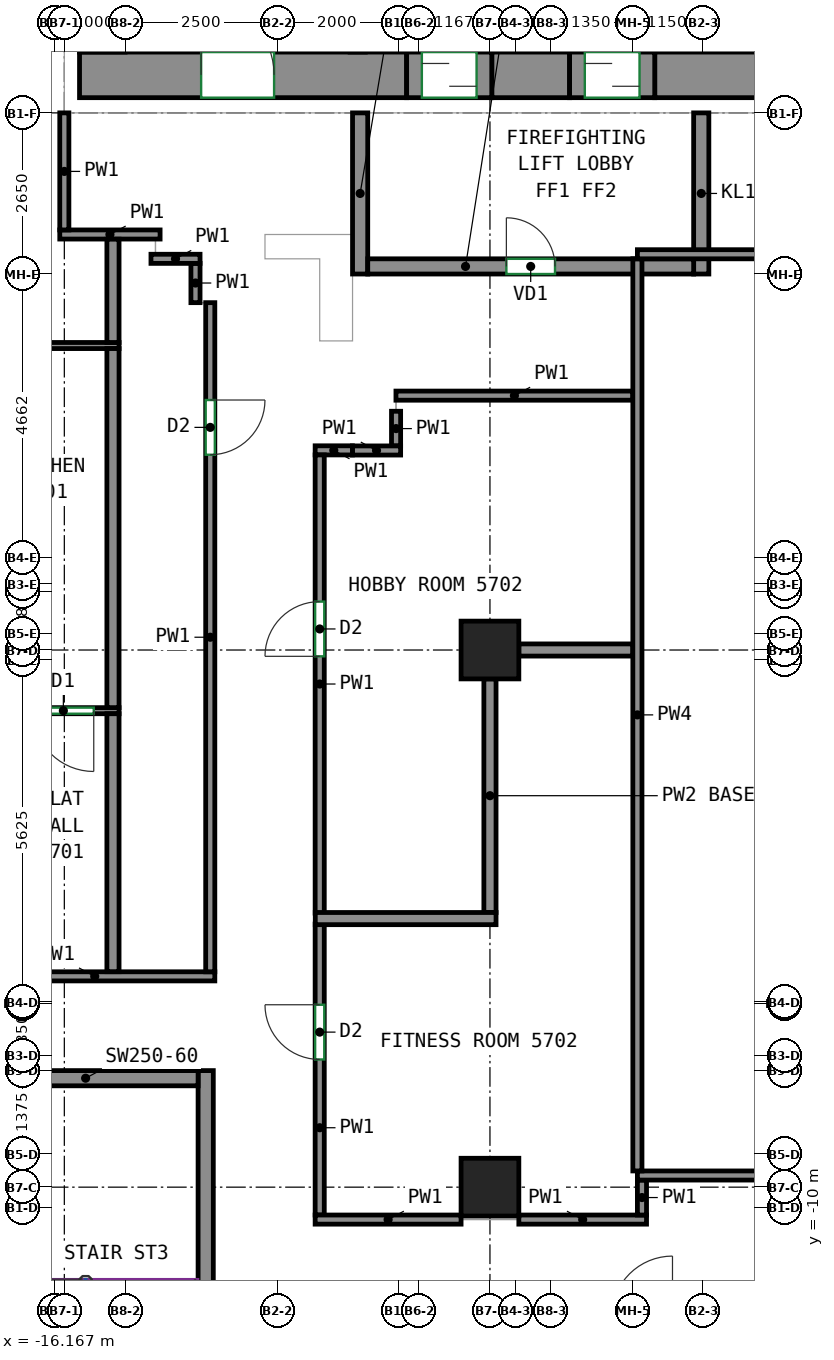
"""IFC4 building model, lengths in metres.
Left out: names, types, materials, properties, quantities, classifications, styles, units other than length and angle.
Written with IfcOpenShell. Run it as: python <this file> out.ifc"""

import sys

from ifc_helpers import new_model, si_unit, direction, frame, frame_2d, origin, origin_2d, place, context, subcontext, project, spatial, rectangle, extrude, source, transform, mapped, element, fill, save


model = new_model("IFC4")
c1 = context("Model", 3, precision=1e-05, world=origin(), true_north=direction((0.0, 1.0)))
c2 = subcontext(c1, "Body", "Model", "MODEL_VIEW")
j1 = project(units=[si_unit("LENGTHUNIT", "METRE"), si_unit("PLANEANGLEUNIT", "RADIAN")], contexts=[c1])
p1 = place(None, origin())
s1 = spatial("IfcSite", under=j1, at=p1, CompositionType="ELEMENT")
p2 = place(p1, origin())
s2 = spatial("IfcBuilding", under=s1, at=p2, CompositionType="ELEMENT")
p3 = place(p2, frame((0.0, 0.0, 239.0)))
s3 = spatial("IfcBuildingStorey", under=s2, at=p3, CompositionType="ELEMENT", Elevation=239.0)
m1 = source(origin(), c2, "Body", "SweptSolid", [
    extrude(rectangle(XDim=0.95, YDim=0.95, at=origin_2d()), origin(), (0.0, 0.0, 1.0), 3.12),
])
for number, where, z_axis, x_axis in (
    (1, (-9.0, -9.667, 0.0), (0.0, 0.0, 1.0), (1.0, 0.0, 0.0)),
    (2, (-9.0, -0.833, 0.0), (0.0, 0.0, 1.0), (1.0, 0.0, 0.0)),
):
    element("IfcColumn", number, at=place(p3, frame(where, z_axis=z_axis, x_axis=x_axis)), inside=s3, PredefinedType="COLUMN", context=c2, shape_type="MappedRepresentation", body=[
        mapped(m1, transform((0.0, 0.0, 0.0))),
    ])
m2 = source(origin(), c2, "Body", "SweptSolid", [
    extrude(rectangle(XDim=5.38, YDim=0.75, at=frame_2d((2.69, 0.0))), origin(), (0.0, 0.0, 1.0), 3.12),
])
p4 = place(p3, frame((-15.75, 8.625, 0.0), z_axis=(0.0, 0.0, 1.0), x_axis=(1.0, 0.0, 0.0)))
e3 = element("IfcWall", 3, at=p4, inside=s3, PredefinedType="SHEAR", context=c2, shape_type="MappedRepresentation", body=[
    mapped(m2, transform((0.0, 0.0, 0.0))),
])
p5 = place(p4, frame((2.0, 0.0, 0.0)))
e4 = element("IfcOpeningElement", 4, at=p5, cuts=e3, PredefinedType="OPENING", context=c2, shape_type="SweptSolid", body=[
    extrude(rectangle(XDim=1.2, YDim=2.1, at=frame_2d((0.6, 1.05))), frame((0.0, 0.385, 0.0), z_axis=(0.0, -1.0, 0.0), x_axis=(1.0, 0.0, 0.0)), (0.0, 0.0, 1.0), 0.77),
])
m3 = source(origin(), c2, "Body", "SweptSolid", [
    extrude(rectangle(XDim=1.28, YDim=0.75, at=frame_2d((0.64, 0.0))), origin(), (0.0, 0.0, 1.0), 3.12),
])
p6 = place(p3, frame((-8.97, 8.625, 0.0), z_axis=(0.0, 0.0, 1.0), x_axis=(1.0, 0.0, 0.0)))
e5 = element("IfcWall", 5, at=p6, inside=s3, PredefinedType="SHEAR", context=c2, shape_type="MappedRepresentation", body=[
    mapped(m3, transform((0.0, 0.0, 0.0))),
])
m4 = source(origin(), c2, "Body", "SweptSolid", [
    extrude(rectangle(XDim=14.18, YDim=0.75, at=frame_2d((7.09, 0.0))), origin(), (0.0, 0.0, 1.0), 3.12),
])
p7 = place(p3, frame((-6.29, 8.625, 0.0), z_axis=(0.0, 0.0, 1.0), x_axis=(1.0, 0.0, 0.0)))
e6 = element("IfcWall", 6, at=p7, inside=s3, PredefinedType="SHEAR", context=c2, shape_type="MappedRepresentation", body=[
    mapped(m4, transform((0.0, 0.0, 0.0))),
])
m5 = source(origin(), c2, "Body", "SweptSolid", [
    extrude(rectangle(XDim=8.0, YDim=0.25, at=frame_2d((4.0, 0.0))), origin(), (0.0, 0.0, 1.0), 3.12),
])
p8 = place(p3, frame((-13.675, -15.75, 0.0), z_axis=(0.0, 0.0, 1.0), x_axis=(0.0, 1.0, 0.0)))
e7 = element("IfcWall", 7, at=p8, inside=s3, PredefinedType="SHEAR", context=c2, shape_type="MappedRepresentation", body=[
    mapped(m5, transform((0.0, 0.0, 0.0))),
])
m6 = source(origin(), c2, "Body", "SweptSolid", [
    extrude(rectangle(XDim=3.7, YDim=0.25, at=frame_2d((1.85, 0.0))), origin(), (0.0, 0.0, 1.0), 3.12),
])
p9 = place(p3, frame((-17.5, -7.875, 0.0), z_axis=(0.0, 0.0, 1.0), x_axis=(1.0, 0.0, 0.0)))
e8 = element("IfcWall", 8, at=p9, inside=s3, PredefinedType="SHEAR", context=c2, shape_type="MappedRepresentation", body=[
    mapped(m6, transform((0.0, 0.0, 0.0))),
])
m7 = source(origin(), c2, "Body", "SweptSolid", [
    extrude(rectangle(XDim=2.65, YDim=0.25, at=frame_2d((1.325, 0.0))), origin(), (0.0, 0.0, 1.0), 2.57),
])
for number, where, z_axis, x_axis in (
    (9, (-11.135, 5.35, 0.0), (0.0, 0.0, 1.0), (0.0, 1.0, 0.0)),
    (10, (-5.525, 5.35, 0.0), (0.0, 0.0, 1.0), (0.0, 1.0, 0.0)),
):
    element("IfcWall", number, at=place(p3, frame(where, z_axis=z_axis, x_axis=x_axis)), inside=s3, PredefinedType="PARTITIONING", context=c2, shape_type="MappedRepresentation", body=[
        mapped(m7, transform((0.0, 0.0, 0.0))),
    ])
m8 = source(origin(), c2, "Body", "SweptSolid", [
    extrude(rectangle(XDim=5.36, YDim=0.25, at=frame_2d((2.68, 0.0))), origin(), (0.0, 0.0, 1.0), 3.12),
])
p10 = place(p3, frame((-11.01, 5.475, 0.0), z_axis=(0.0, 0.0, 1.0), x_axis=(1.0, 0.0, 0.0)))
e11 = element("IfcWall", 11, at=p10, inside=s3, PredefinedType="PARTITIONING", context=c2, shape_type="MappedRepresentation", body=[
    mapped(m8, transform((0.0, 0.0, 0.0))),
])
p11 = place(p10, frame((2.28, 0.0, 0.0)))
e12 = element("IfcOpeningElement", 12, at=p11, cuts=e11, PredefinedType="OPENING", context=c2, shape_type="SweptSolid", body=[
    extrude(rectangle(XDim=0.8, YDim=2.0, at=frame_2d((0.4, 1.0))), frame((0.0, 0.135, 0.0), z_axis=(0.0, -1.0, 0.0), x_axis=(1.0, 0.0, 0.0)), (0.0, 0.0, 1.0), 0.27),
])
m9 = source(origin(), c2, "Body", "SweptSolid", [
    extrude(rectangle(XDim=1.4, YDim=0.75, at=frame_2d((0.7, 0.0))), origin(), (0.0, 0.0, 1.0), 2.7),
])
p12 = place(p3, frame((-10.37, 8.625, 0.0), z_axis=(0.0, 0.0, 1.0), x_axis=(1.0, 0.0, 0.0)))
e13 = element("IfcWall", 13, at=p12, inside=s3, PredefinedType="PARTITIONING", context=c2, shape_type="MappedRepresentation", body=[
    mapped(m9, transform((0.0, 0.0, 0.0))),
])
p13 = place(p12, frame((0.25, 0.0, 0.0)))
e14 = element("IfcOpeningElement", 14, at=p13, cuts=e13, PredefinedType="OPENING", context=c2, shape_type="SweptSolid", body=[
    extrude(rectangle(XDim=0.9, YDim=2.1, at=frame_2d((0.45, 1.05))), frame((0.0, 0.385, 0.0), z_axis=(0.0, -1.0, 0.0), x_axis=(1.0, 0.0, 0.0)), (0.0, 0.0, 1.0), 0.77),
])
m10 = source(origin(), c2, "Body", "SweptSolid", [
    extrude(rectangle(XDim=1.4, YDim=0.75, at=frame_2d((0.7, 0.0))), origin(), (0.0, 0.0, 1.0), 2.7),
])
p14 = place(p3, frame((-7.69, 8.625, 0.0), z_axis=(0.0, 0.0, 1.0), x_axis=(1.0, 0.0, 0.0)))
e15 = element("IfcWall", 15, at=p14, inside=s3, PredefinedType="PARTITIONING", context=c2, shape_type="MappedRepresentation", body=[
    mapped(m10, transform((0.0, 0.0, 0.0))),
])
p15 = place(p14, frame((0.25, 0.0, 0.0)))
e16 = element("IfcOpeningElement", 16, at=p15, cuts=e15, PredefinedType="OPENING", context=c2, shape_type="SweptSolid", body=[
    extrude(rectangle(XDim=0.9, YDim=2.1, at=frame_2d((0.45, 1.05))), frame((0.0, 0.385, 0.0), z_axis=(0.0, -1.0, 0.0), x_axis=(1.0, 0.0, 0.0)), (0.0, 0.0, 1.0), 0.77),
])
p16 = place(p3, frame((-17.475, -6.2, 0.0), z_axis=(0.0, 0.0, 1.0), x_axis=(1.0, 0.0, 0.0)))
e17 = element("IfcWall", 17, at=p16, inside=s3, PredefinedType="PARTITIONING", context=c2, shape_type="SweptSolid", body=[
    extrude(rectangle(XDim=3.95, YDim=0.15, at=frame_2d((1.975, 0.0))), origin(), (0.0, 0.0, 1.0), 3.12),
])
p17 = place(p3, frame((-16.075, 6.0, 0.0), z_axis=(0.0, 0.0, 1.0), x_axis=(1.0, 0.0, 0.0)))
e18 = element("IfcWall", 18, at=p17, inside=s3, PredefinedType="PARTITIONING", context=c2, shape_type="SweptSolid", body=[
    extrude(rectangle(XDim=1.65, YDim=0.15, at=frame_2d((0.825, 0.0))), origin(), (0.0, 0.0, 1.0), 3.12),
])
p18 = place(p3, frame((-16.0, 6.075, 0.0), z_axis=(0.0, 0.0, 1.0), x_axis=(0.0, 1.0, 0.0)))
e19 = element("IfcWall", 19, at=p18, inside=s3, PredefinedType="PARTITIONING", context=c2, shape_type="SweptSolid", body=[
    extrude(rectangle(XDim=1.925, YDim=0.15, at=frame_2d((0.962, 0.0))), origin(), (0.0, 0.0, 1.0), 3.12),
])
p19 = place(p3, frame((-13.6, 4.879, 0.0), z_axis=(0.0, 0.0, 1.0), x_axis=(0.0, -1.0, 0.0)))
e20 = element("IfcWall", 20, at=p19, inside=s3, PredefinedType="PARTITIONING", context=c2, shape_type="SweptSolid", body=[
    extrude(rectangle(XDim=11.004, YDim=0.15, at=frame_2d((5.502, 0.0))), origin(), (0.0, 0.0, 1.0), 3.12),
])
p20 = place(p19, frame((1.601, 0.0, 0.0)))
e21 = element("IfcOpeningElement", 21, at=p20, cuts=e20, PredefinedType="OPENING", context=c2, shape_type="SweptSolid", body=[
    extrude(rectangle(XDim=0.9, YDim=2.1, at=frame_2d((0.45, 1.05))), frame((0.0, 0.085, 0.0), z_axis=(0.0, -1.0, 0.0), x_axis=(1.0, 0.0, 0.0)), (0.0, 0.0, 1.0), 0.17),
])
p21 = place(p3, frame((-13.843, 5.525, 0.0), z_axis=(0.0, 0.0, 1.0), x_axis=(0.0, -1.0, 0.0)))
e22 = element("IfcWall", 22, at=p21, inside=s3, PredefinedType="PARTITIONING", context=c2, shape_type="SweptSolid", body=[
    extrude(rectangle(XDim=0.646, YDim=0.15, at=frame_2d((0.323, 0.0))), origin(), (0.0, 0.0, 1.0), 3.12),
])
p22 = place(p3, frame((-14.575, 5.6, 0.0), z_axis=(0.0, 0.0, 1.0), x_axis=(1.0, 0.0, 0.0)))
e23 = element("IfcWall", 23, at=p22, inside=s3, PredefinedType="PARTITIONING", context=c2, shape_type="SweptSolid", body=[
    extrude(rectangle(XDim=0.807, YDim=0.15, at=frame_2d((0.403, 0.0))), origin(), (0.0, 0.0, 1.0), 3.12),
])
p23 = place(p3, frame((-10.546, 3.35, 0.0), z_axis=(0.0, 0.0, 1.0), x_axis=(1.0, 0.0, 0.0)))
e24 = element("IfcWall", 24, at=p23, inside=s3, PredefinedType="PARTITIONING", context=c2, shape_type="SweptSolid", body=[
    extrude(rectangle(XDim=3.896, YDim=0.15, at=frame_2d((1.948, 0.0))), origin(), (0.0, 0.0, 1.0), 3.12),
])
p24 = place(p3, frame((-10.544, 2.523, 0.0), z_axis=(0.0, 0.0, 1.0), x_axis=(0.0, 1.0, 0.0)))
e25 = element("IfcWall", 25, at=p24, inside=s3, PredefinedType="PARTITIONING", context=c2, shape_type="SweptSolid", body=[
    extrude(rectangle(XDim=0.57, YDim=0.15, at=frame_2d((0.285, 0.0))), origin(), (0.0, 0.0, 1.0), 3.12),
])
p25 = place(p3, frame((-11.262, 2.448, 0.0), z_axis=(0.0, 0.0, 1.0), x_axis=(1.0, 0.0, 0.0)))
e26 = element("IfcWall", 26, at=p25, inside=s3, PredefinedType="PARTITIONING", context=c2, shape_type="SweptSolid", body=[
    extrude(rectangle(XDim=0.793, YDim=0.15, at=frame_2d((0.396, 0.0))), origin(), (0.0, 0.0, 1.0), 3.12),
])
p26 = place(p3, frame((-11.875, 2.45, 0.0), z_axis=(0.0, 0.0, 1.0), x_axis=(1.0, 0.0, 0.0)))
e27 = element("IfcWall", 27, at=p26, inside=s3, PredefinedType="PARTITIONING", context=c2, shape_type="SweptSolid", body=[
    extrude(rectangle(XDim=0.613, YDim=0.15, at=frame_2d((0.307, 0.0))), origin(), (0.0, 0.0, 1.0), 3.12),
])
p27 = place(p3, frame((-11.8, -5.16, 0.0), z_axis=(0.0, 0.0, 1.0), x_axis=(0.0, 1.0, 0.0)))
e28 = element("IfcWall", 28, at=p27, inside=s3, PredefinedType="PARTITIONING", context=c2, shape_type="SweptSolid", body=[
    extrude(rectangle(XDim=7.535, YDim=0.15, at=frame_2d((3.768, 0.0))), origin(), (0.0, 0.0, 1.0), 3.12),
])
p28 = place(p27, frame((4.223, 0.0, 0.0)))
e29 = element("IfcOpeningElement", 29, at=p28, cuts=e28, PredefinedType="OPENING", context=c2, shape_type="SweptSolid", body=[
    extrude(rectangle(XDim=0.9, YDim=2.1, at=frame_2d((0.45, 1.05))), frame((0.0, 0.085, 0.0), z_axis=(0.0, -1.0, 0.0), x_axis=(1.0, 0.0, 0.0)), (0.0, 0.0, 1.0), 0.17),
])
p29 = place(p3, frame((-11.8, -10.125, 0.0), z_axis=(0.0, 0.0, 1.0), x_axis=(0.0, 1.0, 0.0)))
e30 = element("IfcWall", 30, at=p29, inside=s3, PredefinedType="PARTITIONING", context=c2, shape_type="SweptSolid", body=[
    extrude(rectangle(XDim=4.785, YDim=0.15, at=frame_2d((2.393, 0.0))), origin(), (0.0, 0.0, 1.0), 3.12),
])
p30 = place(p29, frame((2.558, 0.0, 0.0)))
e31 = element("IfcOpeningElement", 31, at=p30, cuts=e30, PredefinedType="OPENING", context=c2, shape_type="SweptSolid", body=[
    extrude(rectangle(XDim=0.9, YDim=2.1, at=frame_2d((0.45, 1.05))), frame((0.0, 0.085, 0.0), z_axis=(0.0, -1.0, 0.0), x_axis=(1.0, 0.0, 0.0)), (0.0, 0.0, 1.0), 0.17),
])
p31 = place(p3, frame((-8.525, -10.2, 0.0), z_axis=(0.0, 0.0, 1.0), x_axis=(1.0, 0.0, 0.0)))
e32 = element("IfcWall", 32, at=p31, inside=s3, PredefinedType="PARTITIONING", context=c2, shape_type="SweptSolid", body=[
    extrude(rectangle(XDim=2.1, YDim=0.15, at=frame_2d((1.05, 0.0))), origin(), (0.0, 0.0, 1.0), 3.12),
])
p32 = place(p3, frame((-11.875, -10.2, 0.0), z_axis=(0.0, 0.0, 1.0), x_axis=(1.0, 0.0, 0.0)))
e33 = element("IfcWall", 33, at=p32, inside=s3, PredefinedType="PARTITIONING", context=c2, shape_type="SweptSolid", body=[
    extrude(rectangle(XDim=2.4, YDim=0.15, at=frame_2d((1.2, 0.0))), origin(), (0.0, 0.0, 1.0), 3.12),
])
p33 = place(p3, frame((-6.5, -9.55, 0.0), z_axis=(0.0, 0.0, 1.0), x_axis=(0.0, -1.0, 0.0)))
e34 = element("IfcWall", 34, at=p33, inside=s3, PredefinedType="PARTITIONING", context=c2, shape_type="SweptSolid", body=[
    extrude(rectangle(XDim=0.575, YDim=0.15, at=frame_2d((0.288, 0.0))), origin(), (0.0, 0.0, 1.0), 3.12),
])
p34 = place(p3, frame((-15.1, -1.831, 0.0), z_axis=(0.0, 0.0, 1.0), x_axis=(-1.0, 0.0, 0.0)))
e35 = element("IfcWall", 35, at=p34, inside=s3, PredefinedType="PARTITIONING", context=c2, shape_type="SweptSolid", body=[
    extrude(rectangle(XDim=2.373, YDim=0.1, at=frame_2d((1.187, 0.0))), origin(), (0.0, 0.0, 1.0), 3.12),
])
p35 = place(p34, frame((0.416, 0.0, 0.0)))
e36 = element("IfcOpeningElement", 36, at=p35, cuts=e35, PredefinedType="OPENING", context=c2, shape_type="SweptSolid", body=[
    extrude(rectangle(XDim=1.0, YDim=2.1, at=frame_2d((0.5, 1.05))), frame((0.0, 0.06, 0.0), z_axis=(0.0, -1.0, 0.0), x_axis=(1.0, 0.0, 0.0)), (0.0, 0.0, 1.0), 0.12),
])
p36 = place(p3, frame((-15.2, -6.123, 0.0), z_axis=(0.0, 0.0, 1.0), x_axis=(0.0, 1.0, 0.0)))
e37 = element("IfcWall", 37, at=p36, inside=s3, PredefinedType="PARTITIONING", context=c2, shape_type="SweptSolid", body=[
    extrude(rectangle(XDim=4.242, YDim=0.2, at=frame_2d((2.121, 0.0))), origin(), (0.0, 0.0, 1.0), 3.12),
])
p37 = place(p3, frame((-15.1, 4.174, 0.0), z_axis=(0.0, 0.0, 1.0), x_axis=(-1.0, 0.0, 0.0)))
e38 = element("IfcWall", 38, at=p37, inside=s3, PredefinedType="PARTITIONING", context=c2, shape_type="SweptSolid", body=[
    extrude(rectangle(XDim=2.373, YDim=0.1, at=frame_2d((1.187, 0.0))), origin(), (0.0, 0.0, 1.0), 3.12),
])
p38 = place(p37, frame((1.273, 0.0, 0.0)))
e39 = element("IfcOpeningElement", 39, at=p38, cuts=e38, PredefinedType="OPENING", context=c2, shape_type="SweptSolid", body=[
    extrude(rectangle(XDim=0.9, YDim=2.1, at=frame_2d((0.45, 1.05))), frame((0.0, 0.06, 0.0), z_axis=(0.0, -1.0, 0.0), x_axis=(1.0, 0.0, 0.0)), (0.0, 0.0, 1.0), 0.12),
])
p39 = place(p3, frame((-15.2, -1.781, 0.0), z_axis=(0.0, 0.0, 1.0), x_axis=(0.0, 1.0, 0.0)))
e40 = element("IfcWall", 40, at=p39, inside=s3, PredefinedType="PARTITIONING", context=c2, shape_type="SweptSolid", body=[
    extrude(rectangle(XDim=5.905, YDim=0.2, at=frame_2d((2.953, 0.0))), origin(), (0.0, 0.0, 1.0), 3.12),
])
p40 = place(p3, frame((-15.2, 4.224, 0.0), z_axis=(0.0, 0.0, 1.0), x_axis=(0.0, 1.0, 0.0)))
e41 = element("IfcWall", 41, at=p40, inside=s3, PredefinedType="PARTITIONING", context=c2, shape_type="SweptSolid", body=[
    extrude(rectangle(XDim=1.699, YDim=0.2, at=frame_2d((0.85, 0.0))), origin(), (0.0, 0.0, 1.0), 3.12),
])
p41 = place(p3, frame((-8.525, -0.833, 0.0), z_axis=(0.0, 0.0, 1.0), x_axis=(1.0, 0.0, 0.0)))
e42 = element("IfcWall", 42, at=p41, inside=s3, PredefinedType="PARTITIONING", context=c2, shape_type="SweptSolid", body=[
    extrude(rectangle(XDim=1.875, YDim=0.2, at=frame_2d((0.938, 0.0))), origin(), (0.0, 0.0, 1.0), 3.12),
])
p42 = place(p3, frame((-9.0, -5.15, 0.0), z_axis=(0.0, 0.0, 1.0), x_axis=(0.0, 1.0, 0.0)))
e43 = element("IfcWall", 43, at=p42, inside=s3, PredefinedType="PARTITIONING", context=c2, shape_type="SweptSolid", body=[
    extrude(rectangle(XDim=3.842, YDim=0.2, at=frame_2d((1.921, 0.0))), origin(), (0.0, 0.0, 1.0), 2.57),
])
p43 = place(p3, frame((-11.873, -5.25, 0.0), z_axis=(0.0, 0.0, 1.0), x_axis=(1.0, 0.0, 0.0)))
e44 = element("IfcWall", 44, at=p43, inside=s3, PredefinedType="PARTITIONING", context=c2, shape_type="SweptSolid", body=[
    extrude(rectangle(XDim=2.973, YDim=0.2, at=frame_2d((1.487, 0.0))), origin(), (0.0, 0.0, 1.0), 3.12),
])
p44 = place(p3, frame((8.5, -9.475, 0.0), z_axis=(0.0, 0.0, 1.0), x_axis=(-1.0, 0.0, 0.0)))
e45 = element("IfcWall", 45, at=p44, inside=s3, PredefinedType="PARTITIONING", context=c2, shape_type="SweptSolid", body=[
    extrude(rectangle(XDim=15.075, YDim=0.15, at=frame_2d((7.538, 0.0))), origin(), (0.0, 0.0, 1.0), 3.12),
])
p45 = place(p3, frame((-6.575, -9.4, 0.0), z_axis=(0.0, 0.0, 1.0), x_axis=(0.0, 1.0, 0.0)))
e46 = element("IfcWall", 46, at=p45, inside=s3, PredefinedType="PARTITIONING", context=c2, shape_type="SweptSolid", body=[
    extrude(rectangle(XDim=15.0, YDim=0.15, at=frame_2d((7.5, 0.0))), origin(), (0.0, 0.0, 1.0), 3.12),
])
p46 = place(p3, frame((-6.575, 5.675, 0.0), z_axis=(0.0, 0.0, 1.0), x_axis=(1.0, 0.0, 0.0)))
e47 = element("IfcWall", 47, at=p46, inside=s3, PredefinedType="PARTITIONING", context=c2, shape_type="SweptSolid", body=[
    extrude(rectangle(XDim=15.075, YDim=0.15, at=frame_2d((7.538, 0.0))), origin(), (0.0, 0.0, 1.0), 3.12),
])
p47 = place(p11, origin())
e48 = element("IfcDoor", 48, at=p47, inside=s3, OperationType="SINGLE_SWING_LEFT", PredefinedType="DOOR", context=c2, shape_type="SweptSolid", body=[
    extrude(rectangle(XDim=0.8, YDim=2.0, at=frame_2d((0.4, 1.0))), frame((0.0, 0.025, 0.0), z_axis=(0.0, -1.0, 0.0), x_axis=(1.0, 0.0, 0.0)), (0.0, 0.0, 1.0), 0.05),
])
fill(e12, e48)
p48 = place(p13, origin())
e49 = element("IfcDoor", 49, at=p48, inside=s3, OperationType="SLIDING_TO_LEFT", PredefinedType="DOOR", context=c2, shape_type="SweptSolid", body=[
    extrude(rectangle(XDim=0.9, YDim=2.1, at=frame_2d((0.45, 1.05))), frame((0.0, 0.28, 0.0), z_axis=(0.0, -1.0, 0.0), x_axis=(1.0, 0.0, 0.0)), (0.0, 0.0, 1.0), 0.05),
])
fill(e14, e49)
p49 = place(p15, origin())
e50 = element("IfcDoor", 50, at=p49, inside=s3, OperationType="SLIDING_TO_RIGHT", PredefinedType="DOOR", context=c2, shape_type="SweptSolid", body=[
    extrude(rectangle(XDim=0.9, YDim=2.1, at=frame_2d((0.45, 1.05))), frame((0.0, 0.28, 0.0), z_axis=(0.0, -1.0, 0.0), x_axis=(1.0, 0.0, 0.0)), (0.0, 0.0, 1.0), 0.05),
])
fill(e16, e50)
p50 = place(p5, origin())
e51 = element("IfcDoor", 51, at=p50, inside=s3, OperationType="DOUBLE_DOOR_SINGLE_SWING", PredefinedType="DOOR", context=c2, shape_type="SweptSolid", body=[
    extrude(rectangle(XDim=1.2, YDim=2.1, at=frame_2d((0.6, 1.05))), frame((0.0, 0.28, 0.0), z_axis=(0.0, -1.0, 0.0), x_axis=(1.0, 0.0, 0.0)), (0.0, 0.0, 1.0), 0.05),
])
fill(e4, e51)
p51 = place(p30, origin())
e52 = element("IfcDoor", 52, at=p51, inside=s3, OperationType="SINGLE_SWING_RIGHT", PredefinedType="DOOR", context=c2, shape_type="SweptSolid", body=[
    extrude(rectangle(XDim=0.9, YDim=2.1, at=frame_2d((0.45, 1.05))), frame((0.0, 0.025, 0.0), z_axis=(0.0, -1.0, 0.0), x_axis=(1.0, 0.0, 0.0)), (0.0, 0.0, 1.0), 0.05),
])
fill(e31, e52)
p52 = place(p35, origin())
e53 = element("IfcDoor", 53, at=p52, inside=s3, OperationType="SINGLE_SWING_LEFT", PredefinedType="DOOR", context=c2, shape_type="SweptSolid", body=[
    extrude(rectangle(XDim=1.0, YDim=2.1, at=frame_2d((0.5, 1.05))), frame((0.0, 0.025, 0.0), z_axis=(0.0, -1.0, 0.0), x_axis=(1.0, 0.0, 0.0)), (0.0, 0.0, 1.0), 0.05),
])
fill(e36, e53)
p53 = place(p28, origin())
e54 = element("IfcDoor", 54, at=p53, inside=s3, OperationType="SINGLE_SWING_LEFT", PredefinedType="DOOR", context=c2, shape_type="SweptSolid", body=[
    extrude(rectangle(XDim=0.9, YDim=2.1, at=frame_2d((0.45, 1.05))), frame((0.0, 0.025, 0.0), z_axis=(0.0, -1.0, 0.0), x_axis=(1.0, 0.0, 0.0)), (0.0, 0.0, 1.0), 0.05),
])
fill(e29, e54)
p54 = place(p20, origin())
e55 = element("IfcDoor", 55, at=p54, inside=s3, OperationType="SINGLE_SWING_LEFT", PredefinedType="DOOR", context=c2, shape_type="SweptSolid", body=[
    extrude(rectangle(XDim=0.9, YDim=2.1, at=frame_2d((0.45, 1.05))), frame((0.0, 0.025, 0.0), z_axis=(0.0, -1.0, 0.0), x_axis=(1.0, 0.0, 0.0)), (0.0, 0.0, 1.0), 0.05),
])
fill(e21, e55)
save(model, sys.argv[1])
